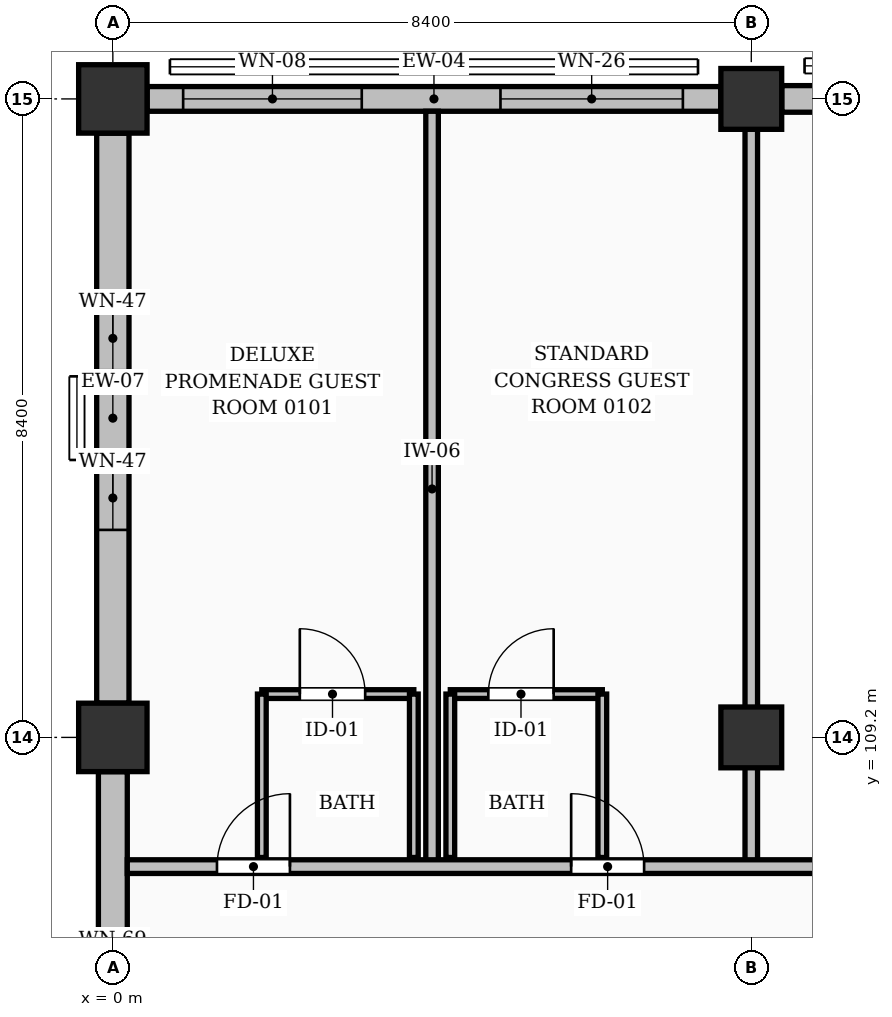
"""IFC4 building model, lengths in metres.
Left out: names, types, materials, properties, quantities, classifications, styles, units other than length and angle.
Written with IfcOpenShell. Run it as: python <this file> out.ifc"""

import sys

from ifc_helpers import new_model, si_unit, direction, frame, frame_2d, origin, origin_2d, place, context, subcontext, project, spatial, rectangle, extrude, element, fill, save


model = new_model("IFC4")
c1 = context("Model", 3, precision=1e-05, world=origin(), true_north=direction((0.0, 1.0)))
c2 = subcontext(c1, "Body", "Model", "MODEL_VIEW")
j1 = project(units=[si_unit("LENGTHUNIT", "METRE"), si_unit("PLANEANGLEUNIT", "RADIAN")], contexts=[c1])
p1 = place(None, origin())
s1 = spatial("IfcSite", under=j1, at=p1, CompositionType="ELEMENT")
p2 = place(p1, origin())
s2 = spatial("IfcBuilding", under=s1, at=p2, CompositionType="ELEMENT")
p3 = place(p2, frame((0.0, 0.0, 3.92)))
s3 = spatial("IfcBuildingStorey", under=s2, at=p3, CompositionType="ELEMENT", Elevation=3.92)
for number, where, z_axis, x_axis in (
    (1, (0.0, 109.2, 0.0), (0.0, 0.0, 1.0), (1.0, 0.0, 0.0)),
    (2, (0.0, 117.6, 0.0), (0.0, 0.0, 1.0), (1.0, 0.0, 0.0)),
):
    element("IfcColumn", number, at=place(p3, frame(where, z_axis=z_axis, x_axis=x_axis)), inside=s3, PredefinedType="COLUMN", context=c2, shape_type="SweptSolid", body=[
        extrude(rectangle(XDim=0.9, YDim=0.9, at=origin_2d()), origin(), (0.0, 0.0, 1.0), 3.64),
    ])
for number, where, z_axis, x_axis in (
    (3, (8.4, 109.2, 0.0), (0.0, 0.0, 1.0), (1.0, 0.0, 0.0)),
    (4, (8.4, 117.6, 0.0), (0.0, 0.0, 1.0), (1.0, 0.0, 0.0)),
):
    element("IfcColumn", number, at=place(p3, frame(where, z_axis=z_axis, x_axis=x_axis)), inside=s3, PredefinedType="COLUMN", context=c2, shape_type="SweptSolid", body=[
        extrude(rectangle(XDim=0.8, YDim=0.8, at=origin_2d()), origin(), (0.0, 0.0, 1.0), 3.64),
    ])
p4 = place(p3, frame((0.451, 117.6, 0.0), z_axis=(0.0, 0.0, 1.0), x_axis=(1.0, 0.0, 0.0)))
e5 = element("IfcWall", 5, at=p4, inside=s3, PredefinedType="SOLIDWALL", context=c2, shape_type="SweptSolid", body=[
    extrude(rectangle(XDim=7.548, YDim=0.325, at=frame_2d((3.774, 0.0))), origin(), (0.0, 0.0, 1.0), 2.445),
])
p5 = place(p4, frame((0.474, 0.0, 0.25)))
e6 = element("IfcOpeningElement", 6, at=p5, cuts=e5, PredefinedType="OPENING", context=c2, shape_type="SweptSolid", body=[
    extrude(rectangle(XDim=2.35, YDim=1.95, at=frame_2d((1.175, 0.975))), frame((0.0, 0.172, 0.0), z_axis=(0.0, -1.0, 0.0), x_axis=(1.0, 0.0, 0.0)), (0.0, 0.0, 1.0), 0.345),
])
p6 = place(p4, frame((4.649, 0.0, 0.25)))
e7 = element("IfcOpeningElement", 7, at=p6, cuts=e5, PredefinedType="OPENING", context=c2, shape_type="SweptSolid", body=[
    extrude(rectangle(XDim=2.4, YDim=1.75, at=frame_2d((1.2, 0.875))), frame((0.0, 0.172, 0.0), z_axis=(0.0, -1.0, 0.0), x_axis=(1.0, 0.0, 0.0)), (0.0, 0.0, 1.0), 0.345),
])
p7 = place(p3, frame((8.801, 117.6, 0.0), z_axis=(0.0, 0.0, 1.0), x_axis=(1.0, 0.0, 0.0)))
e8 = element("IfcWall", 8, at=p7, inside=s3, PredefinedType="SOLIDWALL", context=c2, shape_type="SweptSolid", body=[
    extrude(rectangle(XDim=7.598, YDim=0.35, at=frame_2d((3.799, 0.0))), origin(), (0.0, 0.0, 1.0), 2.445),
])
p8 = place(p7, frame((0.499, 0.0, 0.25)))
e9 = element("IfcOpeningElement", 9, at=p8, cuts=e8, PredefinedType="OPENING", context=c2, shape_type="SweptSolid", body=[
    extrude(rectangle(XDim=2.4, YDim=1.75, at=frame_2d((1.2, 0.875))), frame((0.0, 0.185, 0.0), z_axis=(0.0, -1.0, 0.0), x_axis=(1.0, 0.0, 0.0)), (0.0, 0.0, 1.0), 0.37),
])
p9 = place(p7, frame((4.739, 0.0, 0.25)))
e10 = element("IfcOpeningElement", 10, at=p9, cuts=e8, PredefinedType="OPENING", context=c2, shape_type="SweptSolid", body=[
    extrude(rectangle(XDim=2.32, YDim=1.9, at=frame_2d((1.16, 0.95))), frame((0.0, 0.185, 0.0), z_axis=(0.0, -1.0, 0.0), x_axis=(1.0, 0.0, 0.0)), (0.0, 0.0, 1.0), 0.37),
])
p10 = place(p3, frame((0.0, 101.251, 0.0), z_axis=(0.0, 0.0, 1.0), x_axis=(0.0, 1.0, 0.0)))
e11 = element("IfcWall", 11, at=p10, inside=s3, PredefinedType="SOLIDWALL", context=c2, shape_type="SweptSolid", body=[
    extrude(rectangle(XDim=7.498, YDim=0.38, at=frame_2d((3.749, 0.0))), origin(), (0.0, 0.0, 1.0), 2.734),
])
p11 = place(p10, frame((2.189, 0.0, 0.3)))
e12 = element("IfcOpeningElement", 12, at=p11, cuts=e11, PredefinedType="OPENING", context=c2, shape_type="SweptSolid", body=[
    extrude(rectangle(XDim=1.02, YDim=1.9, at=frame_2d((0.51, 0.95))), frame((0.0, 0.2, 0.0), z_axis=(0.0, -1.0, 0.0), x_axis=(1.0, 0.0, 0.0)), (0.0, 0.0, 1.0), 0.4),
])
p12 = place(p10, frame((4.289, 0.0, 0.3)))
e13 = element("IfcOpeningElement", 13, at=p12, cuts=e11, PredefinedType="OPENING", context=c2, shape_type="SweptSolid", body=[
    extrude(rectangle(XDim=1.02, YDim=1.9, at=frame_2d((0.51, 0.95))), frame((0.0, 0.2, 0.0), z_axis=(0.0, -1.0, 0.0), x_axis=(1.0, 0.0, 0.0)), (0.0, 0.0, 1.0), 0.4),
])
p13 = place(p3, frame((0.0, 109.651, 0.0), z_axis=(0.0, 0.0, 1.0), x_axis=(0.0, 1.0, 0.0)))
e14 = element("IfcWall", 14, at=p13, inside=s3, PredefinedType="SOLIDWALL", context=c2, shape_type="SweptSolid", body=[
    extrude(rectangle(XDim=7.498, YDim=0.425, at=frame_2d((3.749, 0.0))), origin(), (0.0, 0.0, 1.0), 2.734),
])
p14 = place(p13, frame((2.279, 0.0, 0.3)))
e15 = element("IfcOpeningElement", 15, at=p14, cuts=e14, PredefinedType="OPENING", context=c2, shape_type="SweptSolid", body=[
    extrude(rectangle(XDim=0.84, YDim=1.85, at=frame_2d((0.42, 0.925))), frame((0.0, 0.223, 0.0), z_axis=(0.0, -1.0, 0.0), x_axis=(1.0, 0.0, 0.0)), (0.0, 0.0, 1.0), 0.445),
])
p15 = place(p13, frame((4.379, 0.0, 0.3)))
e16 = element("IfcOpeningElement", 16, at=p15, cuts=e14, PredefinedType="OPENING", context=c2, shape_type="SweptSolid", body=[
    extrude(rectangle(XDim=0.84, YDim=1.85, at=frame_2d((0.42, 0.925))), frame((0.0, 0.223, 0.0), z_axis=(0.0, -1.0, 0.0), x_axis=(1.0, 0.0, 0.0)), (0.0, 0.0, 1.0), 0.445),
])
p16 = place(p3, frame((1.96, 109.77, 0.0), z_axis=(0.0, 0.0, 1.0), x_axis=(1.0, 0.0, 0.0)))
e17 = element("IfcWall", 17, at=p16, inside=s3, PredefinedType="PARTITIONING", context=c2, shape_type="SweptSolid", body=[
    extrude(rectangle(XDim=2.0, YDim=0.115, at=frame_2d((1.0, 0.0))), origin(), (0.0, 0.0, 1.0), 3.36),
])
p17 = place(p16, frame((0.5, 0.0, 0.0)))
e18 = element("IfcOpeningElement", 18, at=p17, cuts=e17, PredefinedType="OPENING", context=c2, shape_type="SweptSolid", body=[
    extrude(rectangle(XDim=0.86, YDim=2.05, at=frame_2d((0.43, 1.025))), frame((0.0, 0.067, 0.0), z_axis=(0.0, -1.0, 0.0), x_axis=(1.0, 0.0, 0.0)), (0.0, 0.0, 1.0), 0.135),
])
for number, where, z_axis, x_axis in (
    (19, (1.96, 107.62, 0.0), (0.0, 0.0, 1.0), (0.0, 1.0, 0.0)),
    (20, (3.96, 107.62, 0.0), (0.0, 0.0, 1.0), (0.0, 1.0, 0.0)),
):
    element("IfcWall", number, at=place(p3, frame(where, z_axis=z_axis, x_axis=x_axis)), inside=s3, PredefinedType="PARTITIONING", context=c2, shape_type="SweptSolid", body=[
        extrude(rectangle(XDim=2.15, YDim=0.115, at=frame_2d((1.075, 0.0))), origin(), (0.0, 0.0, 1.0), 3.36),
    ])
p18 = place(p3, frame((4.44, 109.77, 0.0), z_axis=(0.0, 0.0, 1.0), x_axis=(1.0, 0.0, 0.0)))
e21 = element("IfcWall", 21, at=p18, inside=s3, PredefinedType="PARTITIONING", context=c2, shape_type="SweptSolid", body=[
    extrude(rectangle(XDim=2.0, YDim=0.115, at=frame_2d((1.0, 0.0))), origin(), (0.0, 0.0, 1.0), 3.36),
])
p19 = place(p18, frame((0.5, 0.0, 0.0)))
e22 = element("IfcOpeningElement", 22, at=p19, cuts=e21, PredefinedType="OPENING", context=c2, shape_type="SweptSolid", body=[
    extrude(rectangle(XDim=0.86, YDim=2.05, at=frame_2d((0.43, 1.025))), frame((0.0, 0.067, 0.0), z_axis=(0.0, -1.0, 0.0), x_axis=(1.0, 0.0, 0.0)), (0.0, 0.0, 1.0), 0.135),
])
for number, where, z_axis, x_axis in (
    (23, (4.44, 107.62, 0.0), (0.0, 0.0, 1.0), (0.0, 1.0, 0.0)),
    (24, (6.44, 107.62, 0.0), (0.0, 0.0, 1.0), (0.0, 1.0, 0.0)),
):
    element("IfcWall", number, at=place(p3, frame(where, z_axis=z_axis, x_axis=x_axis)), inside=s3, PredefinedType="PARTITIONING", context=c2, shape_type="SweptSolid", body=[
        extrude(rectangle(XDim=2.15, YDim=0.115, at=frame_2d((1.075, 0.0))), origin(), (0.0, 0.0, 1.0), 3.36),
    ])
p20 = place(p3, frame((4.2, 107.5, 0.0), z_axis=(0.0, 0.0, 1.0), x_axis=(0.0, 1.0, 0.0)))
e25 = element("IfcWall", 25, at=p20, inside=s3, PredefinedType="PARTITIONING", context=c2, shape_type="SweptSolid", body=[
    extrude(rectangle(XDim=9.938, YDim=0.165, at=frame_2d((4.969, 0.0))), origin(), (0.0, 0.0, 1.0), 3.36),
])
p21 = place(p3, frame((8.4, 107.5, 0.0), z_axis=(0.0, 0.0, 1.0), x_axis=(0.0, 1.0, 0.0)))
e26 = element("IfcWall", 26, at=p21, inside=s3, PredefinedType="PARTITIONING", context=c2, shape_type="SweptSolid", body=[
    extrude(rectangle(XDim=9.75, YDim=0.165, at=frame_2d((4.875, 0.0))), origin(), (0.0, 0.0, 1.0), 2.395),
])
p22 = place(p3, frame((0.19, 107.5, 0.0), z_axis=(0.0, 0.0, 1.0), x_axis=(1.0, 0.0, 0.0)))
e27 = element("IfcWall", 27, at=p22, inside=s3, PredefinedType="PARTITIONING", context=c2, shape_type="SweptSolid", body=[
    extrude(rectangle(XDim=34.18, YDim=0.18, at=frame_2d((17.09, 0.0))), origin(), (0.0, 0.0, 1.0), 3.36),
])
p23 = place(p22, frame((1.18, 0.0, 0.0)))
e28 = element("IfcOpeningElement", 28, at=p23, cuts=e27, PredefinedType="OPENING", context=c2, shape_type="SweptSolid", body=[
    extrude(rectangle(XDim=0.96, YDim=2.15, at=frame_2d((0.48, 1.075))), frame((0.0, 0.1, 0.0), z_axis=(0.0, -1.0, 0.0), x_axis=(1.0, 0.0, 0.0)), (0.0, 0.0, 1.0), 0.2),
])
p24 = place(p22, frame((5.84, 0.0, 0.0)))
e29 = element("IfcOpeningElement", 29, at=p24, cuts=e27, PredefinedType="OPENING", context=c2, shape_type="SweptSolid", body=[
    extrude(rectangle(XDim=0.96, YDim=2.15, at=frame_2d((0.48, 1.075))), frame((0.0, 0.1, 0.0), z_axis=(0.0, -1.0, 0.0), x_axis=(1.0, 0.0, 0.0)), (0.0, 0.0, 1.0), 0.2),
])
p25 = place(p22, frame((9.58, 0.0, 0.0)))
e30 = element("IfcOpeningElement", 30, at=p25, cuts=e27, PredefinedType="OPENING", context=c2, shape_type="SweptSolid", body=[
    extrude(rectangle(XDim=0.96, YDim=2.15, at=frame_2d((0.48, 1.075))), frame((0.0, 0.1, 0.0), z_axis=(0.0, -1.0, 0.0), x_axis=(1.0, 0.0, 0.0)), (0.0, 0.0, 1.0), 0.2),
])
p26 = place(p22, frame((14.24, 0.0, 0.0)))
e31 = element("IfcOpeningElement", 31, at=p26, cuts=e27, PredefinedType="OPENING", context=c2, shape_type="SweptSolid", body=[
    extrude(rectangle(XDim=0.96, YDim=2.15, at=frame_2d((0.48, 1.075))), frame((0.0, 0.1, 0.0), z_axis=(0.0, -1.0, 0.0), x_axis=(1.0, 0.0, 0.0)), (0.0, 0.0, 1.0), 0.2),
])
p27 = place(p22, frame((17.98, 0.0, 0.0)))
e32 = element("IfcOpeningElement", 32, at=p27, cuts=e27, PredefinedType="OPENING", context=c2, shape_type="SweptSolid", body=[
    extrude(rectangle(XDim=0.96, YDim=2.15, at=frame_2d((0.48, 1.075))), frame((0.0, 0.1, 0.0), z_axis=(0.0, -1.0, 0.0), x_axis=(1.0, 0.0, 0.0)), (0.0, 0.0, 1.0), 0.2),
])
p28 = place(p22, frame((22.64, 0.0, 0.0)))
e33 = element("IfcOpeningElement", 33, at=p28, cuts=e27, PredefinedType="OPENING", context=c2, shape_type="SweptSolid", body=[
    extrude(rectangle(XDim=0.96, YDim=2.15, at=frame_2d((0.48, 1.075))), frame((0.0, 0.1, 0.0), z_axis=(0.0, -1.0, 0.0), x_axis=(1.0, 0.0, 0.0)), (0.0, 0.0, 1.0), 0.2),
])
p29 = place(p22, frame((26.38, 0.0, 0.0)))
e34 = element("IfcOpeningElement", 34, at=p29, cuts=e27, PredefinedType="OPENING", context=c2, shape_type="SweptSolid", body=[
    extrude(rectangle(XDim=0.96, YDim=2.15, at=frame_2d((0.48, 1.075))), frame((0.0, 0.1, 0.0), z_axis=(0.0, -1.0, 0.0), x_axis=(1.0, 0.0, 0.0)), (0.0, 0.0, 1.0), 0.2),
])
p30 = place(p22, frame((31.04, 0.0, 0.0)))
e35 = element("IfcOpeningElement", 35, at=p30, cuts=e27, PredefinedType="OPENING", context=c2, shape_type="SweptSolid", body=[
    extrude(rectangle(XDim=0.96, YDim=2.15, at=frame_2d((0.48, 1.075))), frame((0.0, 0.1, 0.0), z_axis=(0.0, -1.0, 0.0), x_axis=(1.0, 0.0, 0.0)), (0.0, 0.0, 1.0), 0.2),
])
p31 = place(p5, origin())
e36 = element("IfcWindow", 36, at=p31, inside=s3, PartitioningType="DOUBLE_PANEL_VERTICAL", PredefinedType="WINDOW", context=c2, shape_type="SweptSolid", body=[
    extrude(rectangle(XDim=2.35, YDim=1.95, at=frame_2d((1.175, 0.975))), frame((0.0, 0.03, 0.0), z_axis=(0.0, -1.0, 0.0), x_axis=(1.0, 0.0, 0.0)), (0.0, 0.0, 1.0), 0.06),
])
fill(e6, e36)
p32 = place(p6, origin())
e37 = element("IfcWindow", 37, at=p32, inside=s3, PartitioningType="DOUBLE_PANEL_VERTICAL", PredefinedType="WINDOW", context=c2, shape_type="SweptSolid", body=[
    extrude(rectangle(XDim=2.4, YDim=1.75, at=frame_2d((1.2, 0.875))), frame((0.0, 0.03, 0.0), z_axis=(0.0, -1.0, 0.0), x_axis=(1.0, 0.0, 0.0)), (0.0, 0.0, 1.0), 0.06),
])
fill(e7, e37)
p33 = place(p14, origin())
e38 = element("IfcWindow", 38, at=p33, inside=s3, PartitioningType="SINGLE_PANEL", PredefinedType="WINDOW", context=c2, shape_type="SweptSolid", body=[
    extrude(rectangle(XDim=0.84, YDim=1.85, at=frame_2d((0.42, 0.925))), frame((0.0, 0.03, 0.0), z_axis=(0.0, -1.0, 0.0), x_axis=(1.0, 0.0, 0.0)), (0.0, 0.0, 1.0), 0.06),
])
fill(e15, e38)
p34 = place(p15, origin())
e39 = element("IfcWindow", 39, at=p34, inside=s3, PartitioningType="SINGLE_PANEL", PredefinedType="WINDOW", context=c2, shape_type="SweptSolid", body=[
    extrude(rectangle(XDim=0.84, YDim=1.85, at=frame_2d((0.42, 0.925))), frame((0.0, 0.03, 0.0), z_axis=(0.0, -1.0, 0.0), x_axis=(1.0, 0.0, 0.0)), (0.0, 0.0, 1.0), 0.06),
])
fill(e16, e39)
p35 = place(p17, origin())
e40 = element("IfcDoor", 40, at=p35, inside=s3, OperationType="SINGLE_SWING_LEFT", PredefinedType="DOOR", context=c2, shape_type="SweptSolid", body=[
    extrude(rectangle(XDim=0.86, YDim=2.05, at=frame_2d((0.43, 1.025))), frame((0.0, 0.025, 0.0), z_axis=(0.0, -1.0, 0.0), x_axis=(1.0, 0.0, 0.0)), (0.0, 0.0, 1.0), 0.05),
])
fill(e18, e40)
p36 = place(p19, origin())
e41 = element("IfcDoor", 41, at=p36, inside=s3, OperationType="SINGLE_SWING_RIGHT", PredefinedType="DOOR", context=c2, shape_type="SweptSolid", body=[
    extrude(rectangle(XDim=0.86, YDim=2.05, at=frame_2d((0.43, 1.025))), frame((0.0, 0.025, 0.0), z_axis=(0.0, -1.0, 0.0), x_axis=(1.0, 0.0, 0.0)), (0.0, 0.0, 1.0), 0.05),
])
fill(e22, e41)
p37 = place(p23, origin())
e42 = element("IfcDoor", 42, at=p37, inside=s3, OperationType="SINGLE_SWING_RIGHT", PredefinedType="DOOR", context=c2, shape_type="SweptSolid", body=[
    extrude(rectangle(XDim=0.96, YDim=2.15, at=frame_2d((0.48, 1.075))), frame((0.0, 0.025, 0.0), z_axis=(0.0, -1.0, 0.0), x_axis=(1.0, 0.0, 0.0)), (0.0, 0.0, 1.0), 0.05),
])
fill(e28, e42)
p38 = place(p24, origin())
e43 = element("IfcDoor", 43, at=p38, inside=s3, OperationType="SINGLE_SWING_LEFT", PredefinedType="DOOR", context=c2, shape_type="SweptSolid", body=[
    extrude(rectangle(XDim=0.96, YDim=2.15, at=frame_2d((0.48, 1.075))), frame((0.0, 0.025, 0.0), z_axis=(0.0, -1.0, 0.0), x_axis=(1.0, 0.0, 0.0)), (0.0, 0.0, 1.0), 0.05),
])
fill(e29, e43)
save(model, sys.argv[1])
